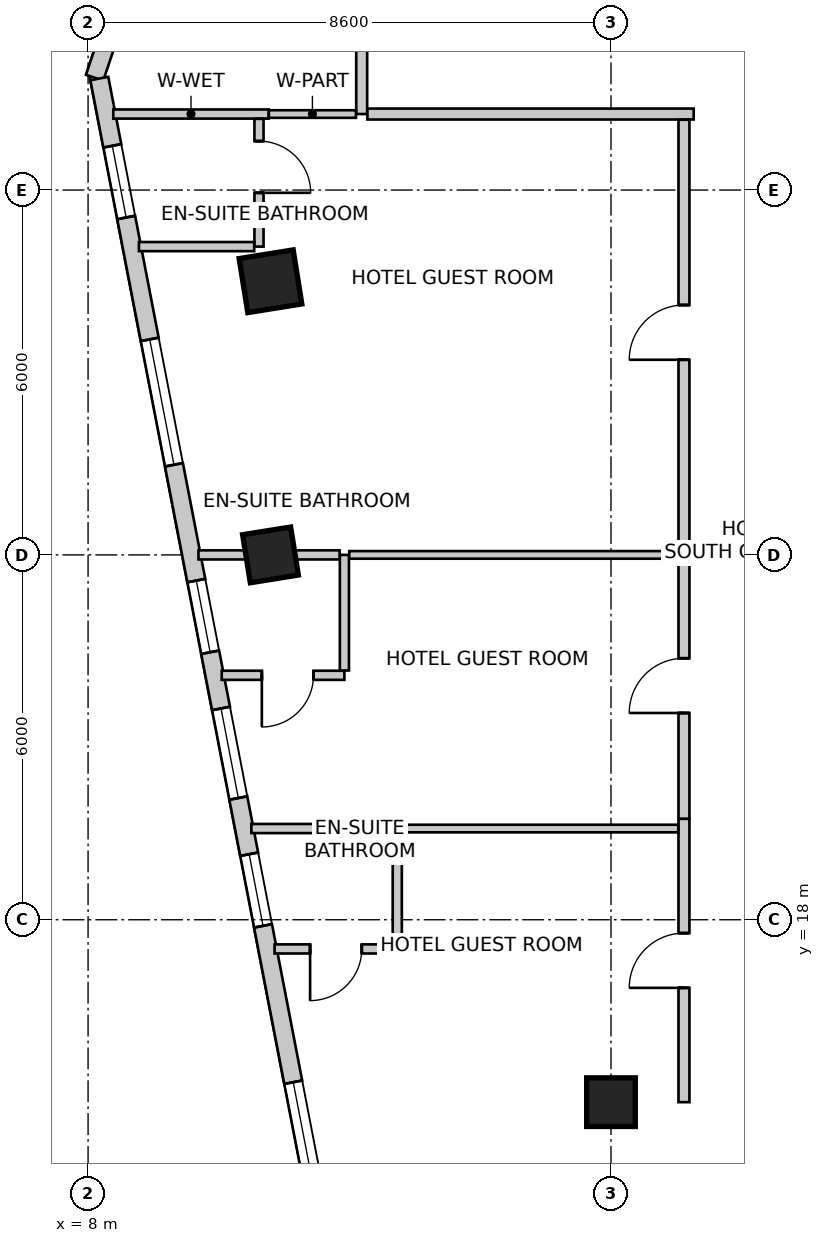
"""IFC4 building model, lengths in metres.
Left out: names, types, materials, properties, quantities, classifications, styles, units other than length and angle.
Written with IfcOpenShell. Run it as: python <this file> out.ifc"""

import sys

from ifc_helpers import new_model, si_unit, direction, frame, frame_2d, origin, origin_2d, place, context, subcontext, project, spatial, rectangle, extrude, source, transform, mapped, element, fill, save


model = new_model("IFC4")
c1 = context("Model", 3, precision=1e-05, world=origin(), true_north=direction((0.0, 1.0)))
c2 = subcontext(c1, "Body", "Model", "MODEL_VIEW")
j1 = project(units=[si_unit("LENGTHUNIT", "METRE"), si_unit("PLANEANGLEUNIT", "RADIAN")], contexts=[c1])
p1 = place(None, origin())
s1 = spatial("IfcSite", under=j1, at=p1, CompositionType="ELEMENT")
p2 = place(p1, origin())
s2 = spatial("IfcBuilding", under=s1, at=p2, CompositionType="ELEMENT")
p3 = place(p2, frame((0.0, 0.0, 125.0)))
s3 = spatial("IfcBuildingStorey", under=s2, at=p3, CompositionType="ELEMENT", Elevation=125.0)
m1 = source(origin(), c2, "Body", "SweptSolid", [
    extrude(rectangle(XDim=0.9, YDim=0.9, at=origin_2d()), origin(), (0.0, 0.0, 1.0), 3.6),
])
p4 = place(p3, frame((11.0, 28.5, 0.0), z_axis=(0.0, 0.0, 1.0), x_axis=(0.158158067254, -0.987413806751, 0.0)))
e1 = element("IfcColumn", 1, at=p4, inside=s3, PredefinedType="COLUMN", context=c2, shape_type="MappedRepresentation", body=[
    mapped(m1, transform((0.0, 0.0, 0.0), scale=1.0)),
])
m2 = source(origin(), c2, "Body", "SweptSolid", [
    extrude(rectangle(XDim=0.8, YDim=0.8, at=origin_2d()), origin(), (0.0, 0.0, 1.0), 3.6),
])
for number, where, z_axis, x_axis in (
    (2, (11.0, 24.0, 0.0), (0.0, 0.0, 1.0), (0.158, -0.987, 0.0)),
    (3, (16.6, 15.0, 0.0), (0.0, 0.0, 1.0), (1.0, 0.0, 0.0)),
):
    element("IfcColumn", number, at=place(p3, frame(where, z_axis=z_axis, x_axis=x_axis)), inside=s3, PredefinedType="COLUMN", context=c2, shape_type="MappedRepresentation", body=[
        mapped(m2, transform((0.0, 0.0, 0.0), scale=1.0)),
    ])
p5 = place(p3, frame((13.269, 47.134, 0.0), z_axis=(0.0, 0.0, 1.0), x_axis=(-0.319929596295, -0.947441319246, 0.0)))
e4 = element("IfcWall", 4, at=p5, inside=s3, PredefinedType="SOLIDWALL", context=c2, shape_type="SweptSolid", body=[
    extrude(rectangle(XDim=16.134, YDim=0.3, at=frame_2d((8.067, 0.0))), origin(), (0.0, 0.0, 1.0), 3.35),
])
m3 = source(origin(), c2, "Body", "SweptSolid", [
    extrude(rectangle(XDim=2.4, YDim=2.2, at=frame_2d((1.2, 1.1))), frame((0.0, 0.16, 0.0), z_axis=(0.0, -1.0, 0.0), x_axis=(1.0, 0.0, 0.0)), (0.0, 0.0, 1.0), 0.32),
])
p6 = place(p5, frame((2.276, 0.0, 0.85)))
e5 = element("IfcOpeningElement", 5, at=p6, cuts=e4, PredefinedType="OPENING", context=c2, shape_type="MappedRepresentation", body=[
    mapped(m3, transform((0.0, 0.0, 0.0), scale=1.0)),
])
m4 = source(origin(), c2, "Body", "SweptSolid", [
    extrude(rectangle(XDim=2.1, YDim=2.0, at=frame_2d((1.05, 1.0))), frame((0.0, 0.16, 0.0), z_axis=(0.0, -1.0, 0.0), x_axis=(1.0, 0.0, 0.0)), (0.0, 0.0, 1.0), 0.32),
])
p7 = place(p5, frame((7.361, 0.0, 0.85)))
e6 = element("IfcOpeningElement", 6, at=p7, cuts=e4, PredefinedType="OPENING", context=c2, shape_type="MappedRepresentation", body=[
    mapped(m4, transform((0.0, 0.0, 0.0), scale=1.0)),
])
p8 = place(p5, frame((12.147, 0.0, 0.85)))
e7 = element("IfcOpeningElement", 7, at=p8, cuts=e4, PredefinedType="OPENING", context=c2, shape_type="MappedRepresentation", body=[
    mapped(m3, transform((0.0, 0.0, 0.0), scale=1.0)),
])
p9 = place(p3, frame((8.185, 31.834, 0.0), z_axis=(0.0, 0.0, 1.0), x_axis=(0.189707113148, -0.981840725994, 0.0)))
e8 = element("IfcWall", 8, at=p9, inside=s3, PredefinedType="SOLIDWALL", context=c2, shape_type="SweptSolid", body=[
    extrude(rectangle(XDim=21.221, YDim=0.3, at=frame_2d((10.611, 0.0))), origin(), (0.0, 0.0, 1.0), 3.35),
])
m5 = source(origin(), c2, "Body", "SweptSolid", [
    extrude(rectangle(XDim=1.2, YDim=1.6, at=frame_2d((0.6, 0.8))), frame((0.0, 0.16, 0.0), z_axis=(0.0, -1.0, 0.0), x_axis=(1.0, 0.0, 0.0)), (0.0, 0.0, 1.0), 0.32),
])
p10 = place(p9, frame((1.127, 0.0, 0.85)))
e9 = element("IfcOpeningElement", 9, at=p10, cuts=e8, PredefinedType="OPENING", context=c2, shape_type="MappedRepresentation", body=[
    mapped(m5, transform((0.0, 0.0, 0.0), scale=1.0)),
])
p11 = place(p9, frame((4.369, 0.0, 0.85)))
e10 = element("IfcOpeningElement", 10, at=p11, cuts=e8, PredefinedType="OPENING", context=c2, shape_type="MappedRepresentation", body=[
    mapped(m4, transform((0.0, 0.0, 0.0), scale=1.0)),
])
p12 = place(p9, frame((8.409, 0.0, 0.85)))
e11 = element("IfcOpeningElement", 11, at=p12, cuts=e8, PredefinedType="OPENING", context=c2, shape_type="MappedRepresentation", body=[
    mapped(m5, transform((0.0, 0.0, 0.0), scale=1.0)),
])
m6 = source(origin(), c2, "Body", "SweptSolid", [
    extrude(rectangle(XDim=1.5, YDim=1.8, at=frame_2d((0.75, 0.9))), frame((0.0, 0.16, 0.0), z_axis=(0.0, -1.0, 0.0), x_axis=(1.0, 0.0, 0.0)), (0.0, 0.0, 1.0), 0.32),
])
p13 = place(p9, frame((10.551, 0.0, 0.85)))
e12 = element("IfcOpeningElement", 12, at=p13, cuts=e8, PredefinedType="OPENING", context=c2, shape_type="MappedRepresentation", body=[
    mapped(m6, transform((0.0, 0.0, 0.0), scale=1.0)),
])
p14 = place(p9, frame((12.992, 0.0, 0.85)))
e13 = element("IfcOpeningElement", 13, at=p14, cuts=e8, PredefinedType="OPENING", context=c2, shape_type="MappedRepresentation", body=[
    mapped(m5, transform((0.0, 0.0, 0.0), scale=1.0)),
])
p15 = place(p9, frame((16.811, 0.0, 0.85)))
e14 = element("IfcOpeningElement", 14, at=p15, cuts=e8, PredefinedType="OPENING", context=c2, shape_type="MappedRepresentation", body=[
    mapped(m4, transform((0.0, 0.0, 0.0), scale=1.0)),
])
p16 = place(p3, frame((12.5, 31.25, 0.0), z_axis=(0.0, 0.0, 1.0), x_axis=(0.0, 1.0, 0.0)))
e15 = element("IfcWall", 15, at=p16, inside=s3, PredefinedType="PARTITIONING", context=c2, shape_type="SweptSolid", body=[
    extrude(rectangle(XDim=2.2, YDim=0.18, at=frame_2d((1.1, 0.0))), origin(), (0.0, 0.0, 1.0), 2.935),
])
p17 = place(p3, frame((17.96, 31.25, 0.0), z_axis=(0.0, 0.0, 1.0), x_axis=(-1.0, 0.0, 0.0)))
e16 = element("IfcWall", 16, at=p17, inside=s3, PredefinedType="PARTITIONING", context=c2, shape_type="SweptSolid", body=[
    extrude(rectangle(XDim=5.366, YDim=0.18, at=frame_2d((2.683, 0.0))), origin(), (0.0, 0.0, 1.0), 2.935),
])
p18 = place(p3, frame((10.971, 31.25, 0.0), z_axis=(0.0, 0.0, 1.0), x_axis=(-1.0, 0.0, 0.0)))
e17 = element("IfcWall", 17, at=p18, inside=s3, PredefinedType="PARTITIONING", context=c2, shape_type="SweptSolid", body=[
    extrude(rectangle(XDim=2.556, YDim=0.15, at=frame_2d((1.278, 0.0))), origin(), (0.0, 0.0, 1.0), 2.492),
])
p19 = place(p3, frame((12.406, 31.25, 0.0), z_axis=(0.0, 0.0, 1.0), x_axis=(-1.0, 0.0, 0.0)))
e18 = element("IfcWall", 18, at=p19, inside=s3, PredefinedType="PARTITIONING", context=c2, shape_type="SweptSolid", body=[
    extrude(rectangle(XDim=1.433, YDim=0.125, at=frame_2d((0.717, 0.0))), origin(), (0.0, 0.0, 1.0), 2.492),
])
p20 = place(p3, frame((17.8, 15.0, 0.0), z_axis=(0.0, 0.0, 1.0), x_axis=(0.0, 1.0, 0.0)))
e19 = element("IfcWall", 19, at=p20, inside=s3, PredefinedType="PARTITIONING", context=c2, shape_type="SweptSolid", body=[
    extrude(rectangle(XDim=4.66, YDim=0.18, at=frame_2d((2.33, 0.0))), origin(), (0.0, 0.0, 1.0), 2.492),
])
m7 = source(origin(), c2, "Body", "SweptSolid", [
    extrude(rectangle(XDim=0.9, YDim=2.15, at=frame_2d((0.45, 1.075))), frame((0.0, 0.1, 0.0), z_axis=(0.0, -1.0, 0.0), x_axis=(1.0, 0.0, 0.0)), (0.0, 0.0, 1.0), 0.2),
])
p21 = place(p20, frame((1.88, 0.0, 0.0)))
e20 = element("IfcOpeningElement", 20, at=p21, cuts=e19, PredefinedType="OPENING", context=c2, shape_type="MappedRepresentation", body=[
    mapped(m7, transform((0.0, 0.0, 0.0), scale=1.0)),
])
p22 = place(p3, frame((17.8, 19.662, 0.0), z_axis=(0.0, 0.0, 1.0), x_axis=(0.0, 1.0, 0.0)))
e21 = element("IfcWall", 21, at=p22, inside=s3, PredefinedType="PARTITIONING", context=c2, shape_type="SweptSolid", body=[
    extrude(rectangle(XDim=4.498, YDim=0.18, at=frame_2d((2.249, 0.0))), origin(), (0.0, 0.0, 1.0), 2.788),
])
p23 = place(p22, frame((1.738, 0.0, 0.0)))
e22 = element("IfcOpeningElement", 22, at=p23, cuts=e21, PredefinedType="OPENING", context=c2, shape_type="MappedRepresentation", body=[
    mapped(m7, transform((0.0, 0.0, 0.0), scale=1.0)),
])
p24 = place(p3, frame((17.8, 24.162, 0.0), z_axis=(0.0, 0.0, 1.0), x_axis=(0.0, 1.0, 0.0)))
e23 = element("IfcWall", 23, at=p24, inside=s3, PredefinedType="PARTITIONING", context=c2, shape_type="SweptSolid", body=[
    extrude(rectangle(XDim=6.994, YDim=0.18, at=frame_2d((3.497, 0.0))), origin(), (0.0, 0.0, 1.0), 2.788),
])
p25 = place(p24, frame((3.047, 0.0, 0.0)))
e24 = element("IfcOpeningElement", 24, at=p25, cuts=e23, PredefinedType="OPENING", context=c2, shape_type="MappedRepresentation", body=[
    mapped(m7, transform((0.0, 0.0, 0.0), scale=1.0)),
])
p26 = place(p3, frame((13.085, 17.52, 0.0), z_axis=(0.0, 0.0, 1.0), x_axis=(-1.0, 0.0, 0.0)))
e25 = element("IfcWall", 25, at=p26, inside=s3, PredefinedType="PARTITIONING", context=c2, shape_type="SweptSolid", body=[
    extrude(rectangle(XDim=2.018, YDim=0.15, at=frame_2d((1.009, 0.0))), origin(), (0.0, 0.0, 1.0), 3.35),
])
m8 = source(origin(), c2, "Body", "SweptSolid", [
    extrude(rectangle(XDim=0.85, YDim=2.15, at=frame_2d((0.425, 1.075))), frame((0.0, 0.085, 0.0), z_axis=(0.0, -1.0, 0.0), x_axis=(1.0, 0.0, 0.0)), (0.0, 0.0, 1.0), 0.17),
])
p27 = place(p26, frame((0.584, 0.0, 0.0)))
e26 = element("IfcOpeningElement", 26, at=p27, cuts=e25, PredefinedType="OPENING", context=c2, shape_type="MappedRepresentation", body=[
    mapped(m8, transform((0.0, 0.0, 0.0), scale=1.0)),
])
p28 = place(p3, frame((13.085, 19.5, 0.0), z_axis=(0.0, 0.0, 1.0), x_axis=(0.0, -1.0, 0.0)))
e27 = element("IfcWall", 27, at=p28, inside=s3, PredefinedType="PARTITIONING", context=c2, shape_type="SweptSolid", body=[
    extrude(rectangle(XDim=1.901, YDim=0.15, at=frame_2d((0.95, 0.0))), origin(), (0.0, 0.0, 1.0), 3.35),
])
p29 = place(p3, frame((10.685, 19.5, 0.0), z_axis=(0.0, 0.0, 1.0), x_axis=(1.0, 0.0, 0.0)))
e28 = element("IfcWall", 28, at=p29, inside=s3, PredefinedType="PARTITIONING", context=c2, shape_type="SweptSolid", body=[
    extrude(rectangle(XDim=2.321, YDim=0.15, at=frame_2d((1.161, 0.0))), origin(), (0.0, 0.0, 1.0), 3.35),
])
p30 = place(p3, frame((13.164, 19.5, 0.0), z_axis=(0.0, 0.0, 1.0), x_axis=(1.0, 0.0, 0.0)))
e29 = element("IfcWall", 29, at=p30, inside=s3, PredefinedType="PARTITIONING", context=c2, shape_type="SweptSolid", body=[
    extrude(rectangle(XDim=4.542, YDim=0.125, at=frame_2d((2.271, 0.0))), origin(), (0.0, 0.0, 1.0), 3.35),
])
p31 = place(p3, frame((12.216, 22.02, 0.0), z_axis=(0.0, 0.0, 1.0), x_axis=(-1.0, 0.0, 0.0)))
e30 = element("IfcWall", 30, at=p31, inside=s3, PredefinedType="PARTITIONING", context=c2, shape_type="SweptSolid", body=[
    extrude(rectangle(XDim=2.018, YDim=0.15, at=frame_2d((1.009, 0.0))), origin(), (0.0, 0.0, 1.0), 3.35),
])
p32 = place(p31, frame((0.508, 0.0, 0.0)))
e31 = element("IfcOpeningElement", 31, at=p32, cuts=e30, PredefinedType="OPENING", context=c2, shape_type="MappedRepresentation", body=[
    mapped(m8, transform((0.0, 0.0, 0.0), scale=1.0)),
])
p33 = place(p3, frame((12.216, 24.0, 0.0), z_axis=(0.0, 0.0, 1.0), x_axis=(0.0, -1.0, 0.0)))
e32 = element("IfcWall", 32, at=p33, inside=s3, PredefinedType="PARTITIONING", context=c2, shape_type="SweptSolid", body=[
    extrude(rectangle(XDim=1.901, YDim=0.15, at=frame_2d((0.95, 0.0))), origin(), (0.0, 0.0, 1.0), 2.788),
])
p34 = place(p3, frame((9.816, 24.0, 0.0), z_axis=(0.0, 0.0, 1.0), x_axis=(1.0, 0.0, 0.0)))
e33 = element("IfcWall", 33, at=p34, inside=s3, PredefinedType="PARTITIONING", context=c2, shape_type="SweptSolid", body=[
    extrude(rectangle(XDim=2.321, YDim=0.15, at=frame_2d((1.161, 0.0))), origin(), (0.0, 0.0, 1.0), 2.492),
])
p35 = place(p3, frame((12.295, 24.0, 0.0), z_axis=(0.0, 0.0, 1.0), x_axis=(1.0, 0.0, 0.0)))
e34 = element("IfcWall", 34, at=p35, inside=s3, PredefinedType="PARTITIONING", context=c2, shape_type="SweptSolid", body=[
    extrude(rectangle(XDim=5.411, YDim=0.125, at=frame_2d((2.706, 0.0))), origin(), (0.0, 0.0, 1.0), 2.803),
])
p36 = place(p3, frame((10.811, 31.171, 0.0), z_axis=(0.0, 0.0, 1.0), x_axis=(0.0, -1.0, 0.0)))
e35 = element("IfcWall", 35, at=p36, inside=s3, PredefinedType="PARTITIONING", context=c2, shape_type="SweptSolid", body=[
    extrude(rectangle(XDim=2.101, YDim=0.15, at=frame_2d((1.05, 0.0))), origin(), (0.0, 0.0, 1.0), 2.492),
])
p37 = place(p36, frame((0.366, 0.0, 0.0)))
e36 = element("IfcOpeningElement", 36, at=p37, cuts=e35, PredefinedType="OPENING", context=c2, shape_type="MappedRepresentation", body=[
    mapped(m8, transform((0.0, 0.0, 0.0), scale=1.0)),
])
p38 = place(p3, frame((10.732, 29.07, 0.0), z_axis=(0.0, 0.0, 1.0), x_axis=(-1.0, 0.0, 0.0)))
e37 = element("IfcWall", 37, at=p38, inside=s3, PredefinedType="PARTITIONING", context=c2, shape_type="SweptSolid", body=[
    extrude(rectangle(XDim=1.896, YDim=0.15, at=frame_2d((0.948, 0.0))), origin(), (0.0, 0.0, 1.0), 3.35),
])
m9 = source(origin(), c2, "Body", "SweptSolid", [
    extrude(rectangle(XDim=1.2, YDim=1.6, at=frame_2d((0.6, 0.8))), frame((0.0, -0.015, 0.0), z_axis=(0.0, -1.0, 0.0), x_axis=(1.0, 0.0, 0.0)), (0.0, 0.0, 1.0), 0.06),
])
p39 = place(p10, origin())
e38 = element("IfcWindow", 38, at=p39, inside=s3, PartitioningType="SINGLE_PANEL", PredefinedType="WINDOW", context=c2, shape_type="MappedRepresentation", body=[
    mapped(m9, transform((0.0, 0.0, 0.0), scale=1.0)),
])
fill(e9, e38)
m10 = source(origin(), c2, "Body", "SweptSolid", [
    extrude(rectangle(XDim=2.1, YDim=2.0, at=frame_2d((1.05, 1.0))), frame((0.0, -0.015, 0.0), z_axis=(0.0, -1.0, 0.0), x_axis=(1.0, 0.0, 0.0)), (0.0, 0.0, 1.0), 0.06),
])
p40 = place(p11, origin())
e39 = element("IfcWindow", 39, at=p40, inside=s3, PartitioningType="SINGLE_PANEL", PredefinedType="WINDOW", context=c2, shape_type="MappedRepresentation", body=[
    mapped(m10, transform((0.0, 0.0, 0.0), scale=1.0)),
])
fill(e10, e39)
p41 = place(p12, origin())
e40 = element("IfcWindow", 40, at=p41, inside=s3, PartitioningType="SINGLE_PANEL", PredefinedType="WINDOW", context=c2, shape_type="MappedRepresentation", body=[
    mapped(m9, transform((0.0, 0.0, 0.0), scale=1.0)),
])
fill(e11, e40)
m11 = source(origin(), c2, "Body", "SweptSolid", [
    extrude(rectangle(XDim=1.5, YDim=1.8, at=frame_2d((0.75, 0.9))), frame((0.0, -0.015, 0.0), z_axis=(0.0, -1.0, 0.0), x_axis=(1.0, 0.0, 0.0)), (0.0, 0.0, 1.0), 0.06),
])
p42 = place(p13, origin())
e41 = element("IfcWindow", 41, at=p42, inside=s3, PartitioningType="SINGLE_PANEL", PredefinedType="WINDOW", context=c2, shape_type="MappedRepresentation", body=[
    mapped(m11, transform((0.0, 0.0, 0.0), scale=1.0)),
])
fill(e12, e41)
p43 = place(p14, origin())
e42 = element("IfcWindow", 42, at=p43, inside=s3, PartitioningType="SINGLE_PANEL", PredefinedType="WINDOW", context=c2, shape_type="MappedRepresentation", body=[
    mapped(m9, transform((0.0, 0.0, 0.0), scale=1.0)),
])
fill(e13, e42)
p44 = place(p15, origin())
e43 = element("IfcWindow", 43, at=p44, inside=s3, PartitioningType="SINGLE_PANEL", PredefinedType="WINDOW", context=c2, shape_type="MappedRepresentation", body=[
    mapped(m10, transform((0.0, 0.0, 0.0), scale=1.0)),
])
fill(e14, e43)
m12 = source(origin(), c2, "Body", "SweptSolid", [
    extrude(rectangle(XDim=0.85, YDim=2.15, at=frame_2d((0.425, 1.075))), frame((0.0, 0.025, 0.0), z_axis=(0.0, -1.0, 0.0), x_axis=(1.0, 0.0, 0.0)), (0.0, 0.0, 1.0), 0.05),
])
p45 = place(p27, origin())
e44 = element("IfcDoor", 44, at=p45, inside=s3, OperationType="SINGLE_SWING_RIGHT", PredefinedType="DOOR", context=c2, shape_type="MappedRepresentation", body=[
    mapped(m12, transform((0.0, 0.0, 0.0), scale=1.0)),
])
fill(e26, e44)
m13 = source(origin(), c2, "Body", "SweptSolid", [
    extrude(rectangle(XDim=0.9, YDim=2.15, at=frame_2d((0.45, 1.075))), frame((0.0, 0.025, 0.0), z_axis=(0.0, -1.0, 0.0), x_axis=(1.0, 0.0, 0.0)), (0.0, 0.0, 1.0), 0.05),
])
p46 = place(p21, origin())
e45 = element("IfcDoor", 45, at=p46, inside=s3, OperationType="SINGLE_SWING_LEFT", PredefinedType="DOOR", context=c2, shape_type="MappedRepresentation", body=[
    mapped(m13, transform((0.0, 0.0, 0.0), scale=1.0)),
])
fill(e20, e45)
p47 = place(p32, origin())
e46 = element("IfcDoor", 46, at=p47, inside=s3, OperationType="SINGLE_SWING_RIGHT", PredefinedType="DOOR", context=c2, shape_type="MappedRepresentation", body=[
    mapped(m12, transform((0.0, 0.0, 0.0), scale=1.0)),
])
fill(e31, e46)
p48 = place(p23, origin())
e47 = element("IfcDoor", 47, at=p48, inside=s3, OperationType="SINGLE_SWING_LEFT", PredefinedType="DOOR", context=c2, shape_type="MappedRepresentation", body=[
    mapped(m13, transform((0.0, 0.0, 0.0), scale=1.0)),
])
fill(e22, e47)
p49 = place(p37, origin())
e48 = element("IfcDoor", 48, at=p49, inside=s3, OperationType="SINGLE_SWING_RIGHT", PredefinedType="DOOR", context=c2, shape_type="MappedRepresentation", body=[
    mapped(m12, transform((0.0, 0.0, 0.0), scale=1.0)),
])
fill(e36, e48)
p50 = place(p25, origin())
e49 = element("IfcDoor", 49, at=p50, inside=s3, OperationType="SINGLE_SWING_LEFT", PredefinedType="DOOR", context=c2, shape_type="MappedRepresentation", body=[
    mapped(m13, transform((0.0, 0.0, 0.0), scale=1.0)),
])
fill(e24, e49)
save(model, sys.argv[1])
